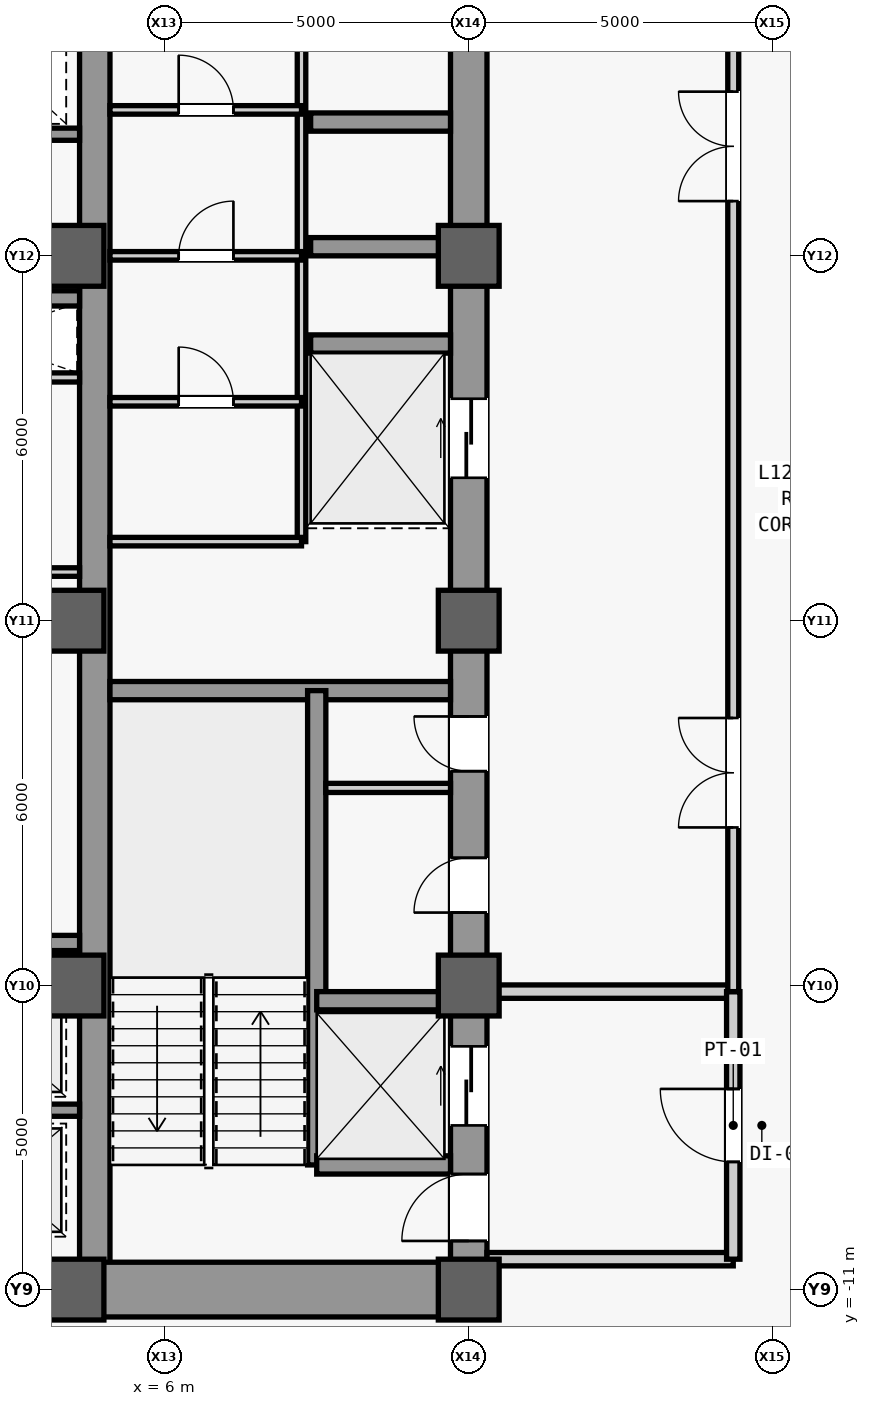
"""IFC4 building model, lengths in metres.
Left out: names, types, materials, properties, quantities, classifications, styles, units other than length and angle.
Written with IfcOpenShell. Run it as: python <this file> out.ifc"""

import sys

from ifc_helpers import new_model, si_unit, direction, frame, frame_2d, origin, origin_2d, place, context, subcontext, project, spatial, rectangle, extrude, source, transform, mapped, element, fill, save


model = new_model("IFC4")
c1 = context("Model", 3, precision=1e-05, world=origin(), true_north=direction((0.0, 1.0)))
c2 = subcontext(c1, "Body", "Model", "MODEL_VIEW")
j1 = project(units=[si_unit("LENGTHUNIT", "METRE"), si_unit("PLANEANGLEUNIT", "RADIAN")], contexts=[c1])
p1 = place(None, origin())
s1 = spatial("IfcSite", under=j1, at=p1, CompositionType="ELEMENT")
p2 = place(p1, origin())
s2 = spatial("IfcBuilding", under=s1, at=p2, CompositionType="ELEMENT")
p3 = place(p2, frame((0.0, 0.0, 57.8)))
s3 = spatial("IfcBuildingStorey", under=s2, at=p3, CompositionType="ELEMENT", Elevation=57.8)
m1 = source(origin(), c2, "Body", "SweptSolid", [
    extrude(rectangle(XDim=22.0, YDim=0.6, at=frame_2d((11.0, 0.0))), origin(), (0.0, 0.0, 1.0), 3.94),
])
p4 = place(p3, frame((11.0, -11.0, 0.0), z_axis=(0.0, 0.0, 1.0), x_axis=(0.0, 1.0, 0.0)))
e1 = element("IfcWall", 1, at=p4, inside=s3, PredefinedType="SHEAR", context=c2, shape_type="MappedRepresentation", body=[
    mapped(m1, transform((0.0, 0.0, 0.0), scale=1.0)),
])
m2 = source(origin(), c2, "Body", "SweptSolid", [
    extrude(rectangle(XDim=1.1, YDim=2.2, at=frame_2d((0.55, 1.1))), frame((0.0, 0.31, 0.0), z_axis=(0.0, -1.0, 0.0), x_axis=(1.0, 0.0, 0.0)), (0.0, 0.0, 1.0), 0.62),
])
p5 = place(p4, frame((0.8, 0.0, 0.0)))
e2 = element("IfcOpeningElement", 2, at=p5, cuts=e1, PredefinedType="OPENING", context=c2, shape_type="MappedRepresentation", body=[
    mapped(m2, transform((0.0, 0.0, 0.0), scale=1.0)),
])
m3 = source(origin(), c2, "Body", "SweptSolid", [
    extrude(rectangle(XDim=0.9, YDim=2.15, at=frame_2d((0.45, 1.075))), frame((0.0, 0.31, 0.0), z_axis=(0.0, -1.0, 0.0), x_axis=(1.0, 0.0, 0.0)), (0.0, 0.0, 1.0), 0.62),
])
p6 = place(p4, frame((6.2, 0.0, 0.0)))
e3 = element("IfcOpeningElement", 3, at=p6, cuts=e1, PredefinedType="OPENING", context=c2, shape_type="MappedRepresentation", body=[
    mapped(m3, transform((0.0, 0.0, 0.0), scale=1.0)),
])
p7 = place(p4, frame((8.525, 0.0, 0.0)))
e4 = element("IfcOpeningElement", 4, at=p7, cuts=e1, PredefinedType="OPENING", context=c2, shape_type="MappedRepresentation", body=[
    mapped(m3, transform((0.0, 0.0, 0.0), scale=1.0)),
])
m4 = source(origin(), c2, "Body", "SweptSolid", [
    extrude(rectangle(XDim=1.3, YDim=2.3, at=frame_2d((0.65, 1.15))), frame((0.0, 0.31, 0.0), z_axis=(0.0, -1.0, 0.0), x_axis=(1.0, 0.0, 0.0)), (0.0, 0.0, 1.0), 0.62),
])
p8 = place(p4, frame((2.7, 0.0, 0.0)))
e5 = element("IfcOpeningElement", 5, at=p8, cuts=e1, PredefinedType="OPENING", context=c2, shape_type="MappedRepresentation", body=[
    mapped(m4, transform((0.0, 0.0, 0.0), scale=1.0)),
])
p9 = place(p4, frame((13.35, 0.0, 0.0)))
e6 = element("IfcOpeningElement", 6, at=p9, cuts=e1, PredefinedType="OPENING", context=c2, shape_type="MappedRepresentation", body=[
    mapped(m4, transform((0.0, 0.0, 0.0), scale=1.0)),
])
m5 = source(origin(), c2, "Body", "SweptSolid", [
    extrude(rectangle(XDim=21.4, YDim=0.5, at=frame_2d((10.7, 0.0))), origin(), (0.0, 0.0, 1.0), 3.94),
])
p10 = place(p3, frame((4.85, -10.7, 0.0), z_axis=(0.0, 0.0, 1.0), x_axis=(0.0, 1.0, 0.0)))
e7 = element("IfcWall", 7, at=p10, inside=s3, PredefinedType="SHEAR", context=c2, shape_type="MappedRepresentation", body=[
    mapped(m5, transform((0.0, 0.0, 0.0), scale=1.0)),
])
m6 = source(origin(), c2, "Body", "SweptSolid", [
    extrude(rectangle(XDim=5.85, YDim=0.9, at=frame_2d((2.925, 0.0))), origin(), (0.0, 0.0, 1.0), 3.94),
])
p11 = place(p3, frame((4.85, -11.0, 0.0), z_axis=(0.0, 0.0, 1.0), x_axis=(1.0, 0.0, 0.0)))
e8 = element("IfcWall", 8, at=p11, inside=s3, PredefinedType="SHEAR", context=c2, shape_type="MappedRepresentation", body=[
    mapped(m6, transform((0.0, 0.0, 0.0), scale=1.0)),
])
m7 = source(origin(), c2, "Body", "SweptSolid", [
    extrude(rectangle(XDim=5.6, YDim=0.3, at=frame_2d((2.8, 0.0))), origin(), (0.0, 0.0, 1.0), 3.94),
])
p12 = place(p3, frame((5.1, -1.15, 0.0), z_axis=(0.0, 0.0, 1.0), x_axis=(1.0, 0.0, 0.0)))
e9 = element("IfcWall", 9, at=p12, inside=s3, PredefinedType="SHEAR", context=c2, shape_type="MappedRepresentation", body=[
    mapped(m7, transform((0.0, 0.0, 0.0), scale=1.0)),
])
m8 = source(origin(), c2, "Body", "SweptSolid", [
    extrude(rectangle(XDim=9.2, YDim=0.5, at=frame_2d((4.6, 0.0))), origin(), (0.0, 0.0, 1.0), 3.94),
])
p13 = place(p3, frame((-4.6, -11.0, 0.0), z_axis=(0.0, 0.0, 1.0), x_axis=(1.0, 0.0, 0.0)))
e10 = element("IfcWall", 10, at=p13, inside=s3, PredefinedType="SHEAR", context=c2, shape_type="MappedRepresentation", body=[
    mapped(m8, transform((0.0, 0.0, 0.0), scale=1.0)),
])
m9 = source(origin(), c2, "Body", "SweptSolid", [
    extrude(rectangle(XDim=1.8, YDim=2.25, at=frame_2d((0.9, 1.125))), frame((0.0, 0.26, 0.0), z_axis=(0.0, -1.0, 0.0), x_axis=(1.0, 0.0, 0.0)), (0.0, 0.0, 1.0), 0.52),
])
p14 = place(p13, frame((3.7, 0.0, 0.0)))
e11 = element("IfcOpeningElement", 11, at=p14, cuts=e10, PredefinedType="OPENING", context=c2, shape_type="MappedRepresentation", body=[
    mapped(m9, transform((0.0, 0.0, 0.0), scale=1.0)),
])
m10 = source(origin(), c2, "Body", "SweptSolid", [
    extrude(rectangle(XDim=1.0, YDim=1.0, at=origin_2d()), origin(), (0.0, 0.0, 1.0), 4.2),
])
for number, where, z_axis, x_axis in (
    (12, (4.5, -11.0, 0.0), (0.0, 0.0, 1.0), (1.0, 0.0, 0.0)),
    (13, (4.5, -6.0, 0.0), (0.0, 0.0, 1.0), (1.0, 0.0, 0.0)),
    (14, (4.5, 0.0, 0.0), (0.0, 0.0, 1.0), (1.0, 0.0, 0.0)),
    (15, (4.5, 6.0, 0.0), (0.0, 0.0, 1.0), (1.0, 0.0, 0.0)),
    (16, (11.0, -11.0, 0.0), (0.0, 0.0, 1.0), (1.0, 0.0, 0.0)),
    (17, (11.0, -6.0, 0.0), (0.0, 0.0, 1.0), (1.0, 0.0, 0.0)),
    (18, (11.0, 0.0, 0.0), (0.0, 0.0, 1.0), (1.0, 0.0, 0.0)),
    (19, (11.0, 6.0, 0.0), (0.0, 0.0, 1.0), (1.0, 0.0, 0.0)),
):
    element("IfcColumn", number, at=place(p3, frame(where, z_axis=z_axis, x_axis=x_axis)), inside=s3, PredefinedType="COLUMN", context=c2, shape_type="MappedRepresentation", body=[
        mapped(m10, transform((0.0, 0.0, 0.0), scale=1.0)),
    ])
m11 = source(origin(), c2, "Body", "SweptSolid", [
    extrude(rectangle(XDim=7.8, YDim=0.3, at=frame_2d((3.9, 0.0))), origin(), (0.0, 0.0, 1.0), 3.94),
])
p15 = place(p3, frame((8.5, -8.95, 0.0), z_axis=(0.0, 0.0, 1.0), x_axis=(0.0, 1.0, 0.0)))
e20 = element("IfcWall", 20, at=p15, inside=s3, PredefinedType="SHEAR", context=c2, shape_type="MappedRepresentation", body=[
    mapped(m11, transform((0.0, 0.0, 0.0), scale=1.0)),
])
m12 = source(origin(), c2, "Body", "SweptSolid", [
    extrude(rectangle(XDim=2.2, YDim=0.3, at=frame_2d((1.1, 0.0))), origin(), (0.0, 0.0, 1.0), 3.94),
])
for number, where, z_axis, x_axis in (
    (21, (8.5, -8.95, 0.0), (0.0, 0.0, 1.0), (1.0, 0.0, 0.0)),
    (22, (8.5, -6.25, 0.0), (0.0, 0.0, 1.0), (1.0, 0.0, 0.0)),
):
    element("IfcWall", number, at=place(p3, frame(where, z_axis=z_axis, x_axis=x_axis)), inside=s3, PredefinedType="SHEAR", context=c2, shape_type="MappedRepresentation", body=[
        mapped(m12, transform((0.0, 0.0, 0.0), scale=1.0)),
    ])
m13 = source(origin(), c2, "Body", "SweptSolid", [
    extrude(rectangle(XDim=2.3, YDim=0.3, at=frame_2d((1.15, 0.0))), origin(), (0.0, 0.0, 1.0), 3.94),
])
for number, where, z_axis, x_axis in (
    (23, (8.4, 4.55, 0.0), (0.0, 0.0, 1.0), (1.0, 0.0, 0.0)),
    (24, (8.4, 6.15, 0.0), (0.0, 0.0, 1.0), (1.0, 0.0, 0.0)),
    (25, (8.4, 8.2, 0.0), (0.0, 0.0, 1.0), (1.0, 0.0, 0.0)),
):
    element("IfcWall", number, at=place(p3, frame(where, z_axis=z_axis, x_axis=x_axis)), inside=s3, PredefinedType="SHEAR", context=c2, shape_type="MappedRepresentation", body=[
        mapped(m13, transform((0.0, 0.0, 0.0), scale=1.0)),
    ])
m14 = source(origin(), c2, "Body", "SweptSolid", [
    extrude(rectangle(XDim=2.05, YDim=0.15, at=frame_2d((1.025, 0.0))), origin(), (0.0, 0.0, 1.0), 3.94),
])
p16 = place(p3, frame((8.65, -2.75, 0.0), z_axis=(0.0, 0.0, 1.0), x_axis=(1.0, 0.0, 0.0)))
e26 = element("IfcWall", 26, at=p16, inside=s3, PredefinedType="PARTITIONING", context=c2, shape_type="MappedRepresentation", body=[
    mapped(m14, transform((0.0, 0.0, 0.0), scale=1.0)),
])
m15 = source(origin(), c2, "Body", "SweptSolid", [
    extrude(rectangle(XDim=9.4, YDim=0.14, at=frame_2d((4.7, 0.0))), origin(), (0.0, 0.0, 1.0), 3.94),
])
p17 = place(p3, frame((8.25, 1.3, 0.0), z_axis=(0.0, 0.0, 1.0), x_axis=(0.0, 1.0, 0.0)))
e27 = element("IfcWall", 27, at=p17, inside=s3, PredefinedType="PARTITIONING", context=c2, shape_type="MappedRepresentation", body=[
    mapped(m15, transform((0.0, 0.0, 0.0), scale=1.0)),
])
m16 = source(origin(), c2, "Body", "SweptSolid", [
    extrude(rectangle(XDim=3.15, YDim=0.14, at=frame_2d((1.575, 0.0))), origin(), (0.0, 0.0, 1.0), 3.94),
])
p18 = place(p3, frame((5.1, 1.3, 0.0), z_axis=(0.0, 0.0, 1.0), x_axis=(1.0, 0.0, 0.0)))
e28 = element("IfcWall", 28, at=p18, inside=s3, PredefinedType="PARTITIONING", context=c2, shape_type="MappedRepresentation", body=[
    mapped(m16, transform((0.0, 0.0, 0.0), scale=1.0)),
])
p19 = place(p3, frame((5.1, 8.4, 0.0), z_axis=(0.0, 0.0, 1.0), x_axis=(1.0, 0.0, 0.0)))
e29 = element("IfcWall", 29, at=p19, inside=s3, PredefinedType="PARTITIONING", context=c2, shape_type="MappedRepresentation", body=[
    mapped(m16, transform((0.0, 0.0, 0.0), scale=1.0)),
])
m17 = source(origin(), c2, "Body", "SweptSolid", [
    extrude(rectangle(XDim=0.9, YDim=2.15, at=frame_2d((0.45, 1.075))), frame((0.0, 0.08, 0.0), z_axis=(0.0, -1.0, 0.0), x_axis=(1.0, 0.0, 0.0)), (0.0, 0.0, 1.0), 0.16),
])
p20 = place(p19, frame((1.13, 0.0, 0.0)))
e30 = element("IfcOpeningElement", 30, at=p20, cuts=e29, PredefinedType="OPENING", context=c2, shape_type="MappedRepresentation", body=[
    mapped(m17, transform((0.0, 0.0, 0.0), scale=1.0)),
])
p21 = place(p3, frame((5.1, 6.0, 0.0), z_axis=(0.0, 0.0, 1.0), x_axis=(1.0, 0.0, 0.0)))
e31 = element("IfcWall", 31, at=p21, inside=s3, PredefinedType="PARTITIONING", context=c2, shape_type="MappedRepresentation", body=[
    mapped(m16, transform((0.0, 0.0, 0.0), scale=1.0)),
])
p22 = place(p21, frame((1.13, 0.0, 0.0)))
e32 = element("IfcOpeningElement", 32, at=p22, cuts=e31, PredefinedType="OPENING", context=c2, shape_type="MappedRepresentation", body=[
    mapped(m17, transform((0.0, 0.0, 0.0), scale=1.0)),
])
p23 = place(p3, frame((5.1, 3.6, 0.0), z_axis=(0.0, 0.0, 1.0), x_axis=(1.0, 0.0, 0.0)))
e33 = element("IfcWall", 33, at=p23, inside=s3, PredefinedType="PARTITIONING", context=c2, shape_type="MappedRepresentation", body=[
    mapped(m16, transform((0.0, 0.0, 0.0), scale=1.0)),
])
p24 = place(p23, frame((1.13, 0.0, 0.0)))
e34 = element("IfcOpeningElement", 34, at=p24, cuts=e33, PredefinedType="OPENING", context=c2, shape_type="MappedRepresentation", body=[
    mapped(m17, transform((0.0, 0.0, 0.0), scale=1.0)),
])
m18 = source(origin(), c2, "Body", "SweptSolid", [
    extrude(rectangle(XDim=4.05, YDim=0.22, at=frame_2d((2.025, 0.0))), origin(), (0.0, 0.0, 1.0), 3.94),
])
p25 = place(p3, frame((11.3, -10.5, 0.0), z_axis=(0.0, 0.0, 1.0), x_axis=(1.0, 0.0, 0.0)))
e35 = element("IfcWall", 35, at=p25, inside=s3, PredefinedType="PARTITIONING", context=c2, shape_type="MappedRepresentation", body=[
    mapped(m18, transform((0.0, 0.0, 0.0), scale=1.0)),
])
m19 = source(origin(), c2, "Body", "SweptSolid", [
    extrude(rectangle(XDim=4.05, YDim=0.22, at=frame_2d((2.025, 0.0))), origin(), (0.0, 0.0, 1.0), 3.085),
])
p26 = place(p3, frame((11.3, -6.1, 0.0), z_axis=(0.0, 0.0, 1.0), x_axis=(1.0, 0.0, 0.0)))
e36 = element("IfcWall", 36, at=p26, inside=s3, PredefinedType="PARTITIONING", context=c2, shape_type="MappedRepresentation", body=[
    mapped(m19, transform((0.0, 0.0, 0.0), scale=1.0)),
])
m20 = source(origin(), c2, "Body", "SweptSolid", [
    extrude(rectangle(XDim=4.4, YDim=0.22, at=frame_2d((2.2, 0.0))), origin(), (0.0, 0.0, 1.0), 3.94),
])
p27 = place(p3, frame((15.35, -10.5, 0.0), z_axis=(0.0, 0.0, 1.0), x_axis=(0.0, 1.0, 0.0)))
e37 = element("IfcWall", 37, at=p27, inside=s3, PredefinedType="PARTITIONING", context=c2, shape_type="MappedRepresentation", body=[
    mapped(m20, transform((0.0, 0.0, 0.0), scale=1.0)),
])
m21 = source(origin(), c2, "Body", "SweptSolid", [
    extrude(rectangle(XDim=1.2, YDim=2.2, at=frame_2d((0.6, 1.1))), frame((0.0, 0.12, 0.0), z_axis=(0.0, -1.0, 0.0), x_axis=(1.0, 0.0, 0.0)), (0.0, 0.0, 1.0), 0.24),
])
p28 = place(p27, frame((1.6, 0.0, 0.0)))
e38 = element("IfcOpeningElement", 38, at=p28, cuts=e37, PredefinedType="OPENING", context=c2, shape_type="MappedRepresentation", body=[
    mapped(m21, transform((0.0, 0.0, 0.0), scale=1.0)),
])
m22 = source(origin(), c2, "Body", "SweptSolid", [
    extrude(rectangle(XDim=16.6, YDim=0.18, at=frame_2d((8.3, 0.0))), origin(), (0.0, 0.0, 1.0), 3.94),
])
p29 = place(p3, frame((15.35, -6.1, 0.0), z_axis=(0.0, 0.0, 1.0), x_axis=(0.0, 1.0, 0.0)))
e39 = element("IfcWall", 39, at=p29, inside=s3, PredefinedType="PARTITIONING", context=c2, shape_type="MappedRepresentation", body=[
    mapped(m22, transform((0.0, 0.0, 0.0), scale=1.0)),
])
m23 = source(origin(), c2, "Body", "SweptSolid", [
    extrude(rectangle(XDim=1.8, YDim=2.25, at=frame_2d((0.9, 1.125))), frame((0.0, 0.1, 0.0), z_axis=(0.0, -1.0, 0.0), x_axis=(1.0, 0.0, 0.0)), (0.0, 0.0, 1.0), 0.2),
])
p30 = place(p29, frame((2.7, 0.0, 0.0)))
e40 = element("IfcOpeningElement", 40, at=p30, cuts=e39, PredefinedType="OPENING", context=c2, shape_type="MappedRepresentation", body=[
    mapped(m23, transform((0.0, 0.0, 0.0), scale=1.0)),
])
p31 = place(p29, frame((13.0, 0.0, 0.0)))
e41 = element("IfcOpeningElement", 41, at=p31, cuts=e39, PredefinedType="OPENING", context=c2, shape_type="MappedRepresentation", body=[
    mapped(m23, transform((0.0, 0.0, 0.0), scale=1.0)),
])
m24 = source(origin(), c2, "Body", "SweptSolid", [
    extrude(rectangle(XDim=3.45, YDim=0.15, at=frame_2d((1.725, 0.0))), origin(), (0.0, 0.0, 1.0), 3.94),
])
p32 = place(p3, frame((1.15, 4.0, 0.0), z_axis=(0.0, 0.0, 1.0), x_axis=(1.0, 0.0, 0.0)))
e42 = element("IfcWall", 42, at=p32, inside=s3, PredefinedType="PARTITIONING", context=c2, shape_type="MappedRepresentation", body=[
    mapped(m24, transform((0.0, 0.0, 0.0), scale=1.0)),
])
m25 = source(origin(), c2, "Body", "SweptSolid", [
    extrude(rectangle(XDim=2.45, YDim=0.2, at=frame_2d((1.225, 0.0))), origin(), (0.0, 0.0, 1.0), 3.94),
])
p33 = place(p3, frame((2.15, -8.05, 0.0), z_axis=(0.0, 0.0, 1.0), x_axis=(1.0, 0.0, 0.0)))
e43 = element("IfcWall", 43, at=p33, inside=s3, PredefinedType="SHEAR", context=c2, shape_type="MappedRepresentation", body=[
    mapped(m25, transform((0.0, 0.0, 0.0), scale=1.0)),
])
m26 = source(origin(), c2, "Body", "SweptSolid", [
    extrude(rectangle(XDim=9.2, YDim=0.25, at=frame_2d((4.6, 0.0))), origin(), (0.0, 0.0, 1.0), 3.94),
])
p34 = place(p3, frame((-4.6, -5.3, 0.0), z_axis=(0.0, 0.0, 1.0), x_axis=(1.0, 0.0, 0.0)))
e44 = element("IfcWall", 44, at=p34, inside=s3, PredefinedType="SHEAR", context=c2, shape_type="MappedRepresentation", body=[
    mapped(m26, transform((0.0, 0.0, 0.0), scale=1.0)),
])
m27 = source(origin(), c2, "Body", "SweptSolid", [
    extrude(rectangle(XDim=1.05, YDim=2.2, at=frame_2d((0.525, 1.1))), frame((0.0, 0.135, 0.0), z_axis=(0.0, -1.0, 0.0), x_axis=(1.0, 0.0, 0.0)), (0.0, 0.0, 1.0), 0.27),
])
p35 = place(p34, frame((4.075, 0.0, 0.0)))
e45 = element("IfcOpeningElement", 45, at=p35, cuts=e44, PredefinedType="OPENING", context=c2, shape_type="MappedRepresentation", body=[
    mapped(m27, transform((0.0, 0.0, 0.0), scale=1.0)),
])
p36 = place(p3, frame((2.15, 8.0, 0.0), z_axis=(0.0, 0.0, 1.0), x_axis=(1.0, 0.0, 0.0)))
e46 = element("IfcWall", 46, at=p36, inside=s3, PredefinedType="SHEAR", context=c2, shape_type="MappedRepresentation", body=[
    mapped(m25, transform((0.0, 0.0, 0.0), scale=1.0)),
])
p37 = place(p3, frame((-4.6, 5.3, 0.0), z_axis=(0.0, 0.0, 1.0), x_axis=(1.0, 0.0, 0.0)))
e47 = element("IfcWall", 47, at=p37, inside=s3, PredefinedType="SHEAR", context=c2, shape_type="MappedRepresentation", body=[
    mapped(m26, transform((0.0, 0.0, 0.0), scale=1.0)),
])
p38 = place(p37, frame((4.075, 0.0, 0.0)))
e48 = element("IfcOpeningElement", 48, at=p38, cuts=e47, PredefinedType="OPENING", context=c2, shape_type="MappedRepresentation", body=[
    mapped(m27, transform((0.0, 0.0, 0.0), scale=1.0)),
])
m28 = source(origin(), c2, "Body", "SweptSolid", [
    extrude(rectangle(XDim=3.45, YDim=0.14, at=frame_2d((1.725, 0.0))), origin(), (0.0, 0.0, 1.0), 3.94),
])
p39 = place(p3, frame((1.15, 0.8, 0.0), z_axis=(0.0, 0.0, 1.0), x_axis=(1.0, 0.0, 0.0)))
e49 = element("IfcWall", 49, at=p39, inside=s3, PredefinedType="PARTITIONING", context=c2, shape_type="MappedRepresentation", body=[
    mapped(m28, transform((0.0, 0.0, 0.0), scale=1.0)),
])
m29 = source(origin(), c2, "Body", "SweptSolid", [
    extrude(rectangle(XDim=1.1, YDim=2.2, at=frame_2d((0.55, 1.1))), frame((0.0, 0.025, 0.0), z_axis=(0.0, -1.0, 0.0), x_axis=(1.0, 0.0, 0.0)), (0.0, 0.0, 1.0), 0.05),
])
p40 = place(p5, origin())
e50 = element("IfcDoor", 50, at=p40, inside=s3, OperationType="SINGLE_SWING_LEFT", PredefinedType="DOOR", context=c2, shape_type="MappedRepresentation", body=[
    mapped(m29, transform((0.0, 0.0, 0.0), scale=1.0)),
])
fill(e2, e50)
m30 = source(origin(), c2, "Body", "SweptSolid", [
    extrude(rectangle(XDim=0.9, YDim=2.15, at=frame_2d((0.45, 1.075))), frame((0.0, 0.025, 0.0), z_axis=(0.0, -1.0, 0.0), x_axis=(1.0, 0.0, 0.0)), (0.0, 0.0, 1.0), 0.05),
])
p41 = place(p6, origin())
e51 = element("IfcDoor", 51, at=p41, inside=s3, OperationType="SINGLE_SWING_LEFT", PredefinedType="DOOR", context=c2, shape_type="MappedRepresentation", body=[
    mapped(m30, transform((0.0, 0.0, 0.0), scale=1.0)),
])
fill(e3, e51)
p42 = place(p7, origin())
e52 = element("IfcDoor", 52, at=p42, inside=s3, OperationType="SINGLE_SWING_RIGHT", PredefinedType="DOOR", context=c2, shape_type="MappedRepresentation", body=[
    mapped(m30, transform((0.0, 0.0, 0.0), scale=1.0)),
])
fill(e4, e52)
p43 = place(p20, origin())
e53 = element("IfcDoor", 53, at=p43, inside=s3, OperationType="SINGLE_SWING_LEFT", PredefinedType="DOOR", context=c2, shape_type="MappedRepresentation", body=[
    mapped(m30, transform((0.0, 0.0, 0.0), scale=1.0)),
])
fill(e30, e53)
p44 = place(p22, origin())
e54 = element("IfcDoor", 54, at=p44, inside=s3, OperationType="SINGLE_SWING_RIGHT", PredefinedType="DOOR", context=c2, shape_type="MappedRepresentation", body=[
    mapped(m30, transform((0.0, 0.0, 0.0), scale=1.0)),
])
fill(e32, e54)
p45 = place(p24, origin())
e55 = element("IfcDoor", 55, at=p45, inside=s3, OperationType="SINGLE_SWING_LEFT", PredefinedType="DOOR", context=c2, shape_type="MappedRepresentation", body=[
    mapped(m30, transform((0.0, 0.0, 0.0), scale=1.0)),
])
fill(e34, e55)
m31 = source(origin(), c2, "Body", "SweptSolid", [
    extrude(rectangle(XDim=1.2, YDim=2.2, at=frame_2d((0.6, 1.1))), frame((0.0, 0.025, 0.0), z_axis=(0.0, -1.0, 0.0), x_axis=(1.0, 0.0, 0.0)), (0.0, 0.0, 1.0), 0.05),
])
p46 = place(p28, origin())
e56 = element("IfcDoor", 56, at=p46, inside=s3, OperationType="SINGLE_SWING_RIGHT", PredefinedType="DOOR", context=c2, shape_type="MappedRepresentation", body=[
    mapped(m31, transform((0.0, 0.0, 0.0), scale=1.0)),
])
fill(e38, e56)
m32 = source(origin(), c2, "Body", "SweptSolid", [
    extrude(rectangle(XDim=1.8, YDim=2.25, at=frame_2d((0.9, 1.125))), frame((0.0, 0.025, 0.0), z_axis=(0.0, -1.0, 0.0), x_axis=(1.0, 0.0, 0.0)), (0.0, 0.0, 1.0), 0.05),
])
p47 = place(p30, origin())
e57 = element("IfcDoor", 57, at=p47, inside=s3, OperationType="SINGLE_SWING_RIGHT", PredefinedType="DOOR", context=c2, shape_type="MappedRepresentation", body=[
    mapped(m32, transform((0.0, 0.0, 0.0), scale=1.0)),
])
fill(e40, e57)
p48 = place(p31, origin())
e58 = element("IfcDoor", 58, at=p48, inside=s3, OperationType="SINGLE_SWING_LEFT", PredefinedType="DOOR", context=c2, shape_type="MappedRepresentation", body=[
    mapped(m32, transform((0.0, 0.0, 0.0), scale=1.0)),
])
fill(e41, e58)
m33 = source(origin(), c2, "Body", "SweptSolid", [
    extrude(rectangle(XDim=1.3, YDim=2.3, at=frame_2d((0.65, 1.15))), frame((0.0, 0.025, 0.0), z_axis=(0.0, -1.0, 0.0), x_axis=(1.0, 0.0, 0.0)), (0.0, 0.0, 1.0), 0.05),
])
p49 = place(p8, origin())
e59 = element("IfcDoor", 59, at=p49, inside=s3, OperationType="SLIDING_TO_LEFT", PredefinedType="DOOR", context=c2, shape_type="MappedRepresentation", body=[
    mapped(m33, transform((0.0, 0.0, 0.0), scale=1.0)),
])
fill(e5, e59)
p50 = place(p9, origin())
e60 = element("IfcDoor", 60, at=p50, inside=s3, OperationType="SLIDING_TO_LEFT", PredefinedType="DOOR", context=c2, shape_type="MappedRepresentation", body=[
    mapped(m33, transform((0.0, 0.0, 0.0), scale=1.0)),
])
fill(e6, e60)
save(model, sys.argv[1])
